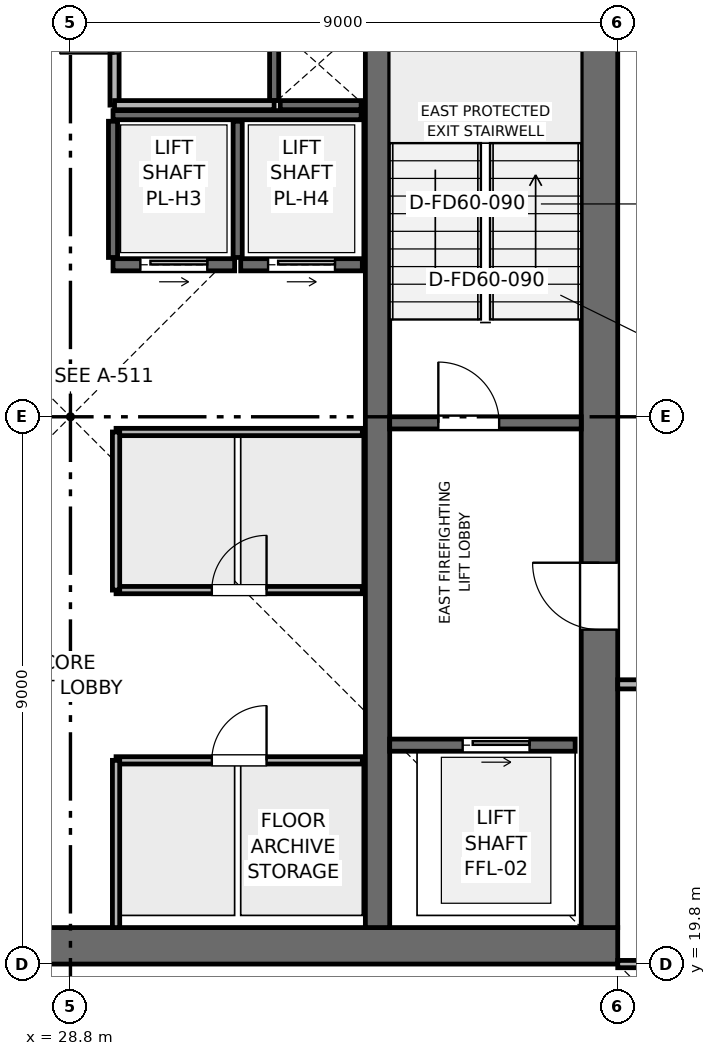
"""IFC4 building model, lengths in metres.
Left out: names, types, materials, properties, quantities, classifications, styles, units other than length and angle.
Written with IfcOpenShell. Run it as: python <this file> out.ifc"""

import sys

from ifc_helpers import new_model, si_unit, direction, frame, frame_2d, origin, place, context, subcontext, project, spatial, rectangle, extrude, element, fill, save


model = new_model("IFC4")
c1 = context("Model", 3, precision=1e-05, world=origin(), true_north=direction((0.0, 1.0)))
c2 = subcontext(c1, "Body", "Model", "MODEL_VIEW")
j1 = project(units=[si_unit("LENGTHUNIT", "METRE"), si_unit("PLANEANGLEUNIT", "RADIAN")], contexts=[c1])
p1 = place(None, origin())
s1 = spatial("IfcSite", under=j1, at=p1, CompositionType="ELEMENT")
p2 = place(p1, origin())
s2 = spatial("IfcBuilding", under=s1, at=p2, CompositionType="ELEMENT")
p3 = place(p2, frame((0.0, 0.0, 344.25)))
s3 = spatial("IfcBuildingStorey", under=s2, at=p3, CompositionType="ELEMENT", Elevation=344.25)
p4 = place(p3, frame((19.8, 20.1, 0.0), z_axis=(0.0, 0.0, 1.0), x_axis=(1.0, 0.0, 0.0)))
e1 = element("IfcWall", 1, at=p4, inside=s3, PredefinedType="SHEAR", context=c2, shape_type="SweptSolid", body=[
    extrude(rectangle(XDim=18.0, YDim=0.6, at=frame_2d((9.0, 0.0))), origin(), (0.0, 0.0, 1.0), 3.75),
])
p5 = place(p3, frame((37.5, 20.4, 0.0), z_axis=(0.0, 0.0, 1.0), x_axis=(0.0, 1.0, 0.0)))
e2 = element("IfcWall", 2, at=p5, inside=s3, PredefinedType="SHEAR", context=c2, shape_type="SweptSolid", body=[
    extrude(rectangle(XDim=16.8, YDim=0.6, at=frame_2d((8.4, 0.0))), origin(), (0.0, 0.0, 1.0), 3.75),
])
p6 = place(p5, frame((4.9, 0.0, 0.0)))
e3 = element("IfcOpeningElement", 3, at=p6, cuts=e2, PredefinedType="OPENING", context=c2, shape_type="SweptSolid", body=[
    extrude(rectangle(XDim=1.1, YDim=2.15, at=frame_2d((0.55, 1.075))), frame((0.0, 0.31, 0.0), z_axis=(0.0, -1.0, 0.0), x_axis=(1.0, 0.0, 0.0)), (0.0, 0.0, 1.0), 0.62),
])
p7 = place(p3, frame((33.85, 20.4, 0.0), z_axis=(0.0, 0.0, 1.0), x_axis=(0.0, 1.0, 0.0)))
e4 = element("IfcWall", 4, at=p7, inside=s3, PredefinedType="SHEAR", context=c2, shape_type="SweptSolid", body=[
    extrude(rectangle(XDim=16.8, YDim=0.4, at=frame_2d((8.4, 0.0))), origin(), (0.0, 0.0, 1.0), 3.75),
])
p8 = place(p3, frame((34.05, 28.7, 0.0), z_axis=(0.0, 0.0, 1.0), x_axis=(1.0, 0.0, 0.0)))
e5 = element("IfcWall", 5, at=p8, inside=s3, PredefinedType="SHEAR", context=c2, shape_type="SweptSolid", body=[
    extrude(rectangle(XDim=3.15, YDim=0.2, at=frame_2d((1.575, 0.0))), origin(), (0.0, 0.0, 1.0), 3.51),
])
p9 = place(p8, frame((0.8, 0.0, 0.0)))
e6 = element("IfcOpeningElement", 6, at=p9, cuts=e5, PredefinedType="OPENING", context=c2, shape_type="SweptSolid", body=[
    extrude(rectangle(XDim=1.0, YDim=2.1, at=frame_2d((0.5, 1.05))), frame((0.0, 0.11, 0.0), z_axis=(0.0, -1.0, 0.0), x_axis=(1.0, 0.0, 0.0)), (0.0, 0.0, 1.0), 0.22),
])
p10 = place(p3, frame((32.15, 34.0, 0.0), z_axis=(0.0, 0.0, 1.0), x_axis=(0.0, 1.0, 0.0)))
e7 = element("IfcWall", 7, at=p10, inside=s3, PredefinedType="SHEAR", context=c2, shape_type="SweptSolid", body=[
    extrude(rectangle(XDim=3.2, YDim=0.15, at=frame_2d((1.6, 0.0))), origin(), (0.0, 0.0, 1.0), 3.51),
])
p11 = place(p3, frame((32.25, 33.925, 0.0), z_axis=(0.0, 0.0, 1.0), x_axis=(1.0, 0.0, 0.0)))
e8 = element("IfcWall", 8, at=p11, inside=s3, PredefinedType="SHEAR", context=c2, shape_type="SweptSolid", body=[
    extrude(rectangle(XDim=1.33, YDim=0.15, at=frame_2d((0.665, 0.0))), origin(), (0.0, 0.0, 1.0), 3.51),
])
p12 = place(p3, frame((34.05, 23.4, 0.0), z_axis=(0.0, 0.0, 1.0), x_axis=(1.0, 0.0, 0.0)))
e9 = element("IfcWall", 9, at=p12, inside=s3, PredefinedType="SHEAR", context=c2, shape_type="SweptSolid", body=[
    extrude(rectangle(XDim=3.05, YDim=0.2, at=frame_2d((1.525, 0.0))), origin(), (0.0, 0.0, 1.0), 3.51),
])
p13 = place(p12, frame((1.2, 0.0, 0.0)))
e10 = element("IfcOpeningElement", 10, at=p13, cuts=e9, PredefinedType="OPENING", context=c2, shape_type="SweptSolid", body=[
    extrude(rectangle(XDim=1.1, YDim=2.15, at=frame_2d((0.55, 1.075))), frame((0.0, 0.11, 0.0), z_axis=(0.0, -1.0, 0.0), x_axis=(1.0, 0.0, 0.0)), (0.0, 0.0, 1.0), 0.22),
])
p14 = place(p3, frame((29.5, 31.3, 0.0), z_axis=(0.0, 0.0, 1.0), x_axis=(1.0, 0.0, 0.0)))
e11 = element("IfcWall", 11, at=p14, inside=s3, PredefinedType="SHEAR", context=c2, shape_type="SweptSolid", body=[
    extrude(rectangle(XDim=2.0, YDim=0.2, at=frame_2d((1.0, 0.0))), origin(), (0.0, 0.0, 1.0), 3.51),
])
p15 = place(p14, frame((0.45, 0.0, 0.0)))
e12 = element("IfcOpeningElement", 12, at=p15, cuts=e11, PredefinedType="OPENING", context=c2, shape_type="SweptSolid", body=[
    extrude(rectangle(XDim=1.1, YDim=2.15, at=frame_2d((0.55, 1.075))), frame((0.0, 0.11, 0.0), z_axis=(0.0, -1.0, 0.0), x_axis=(1.0, 0.0, 0.0)), (0.0, 0.0, 1.0), 0.22),
])
p16 = place(p3, frame((31.6, 31.3, 0.0), z_axis=(0.0, 0.0, 1.0), x_axis=(1.0, 0.0, 0.0)))
e13 = element("IfcWall", 13, at=p16, inside=s3, PredefinedType="SHEAR", context=c2, shape_type="SweptSolid", body=[
    extrude(rectangle(XDim=2.0, YDim=0.2, at=frame_2d((1.0, 0.0))), origin(), (0.0, 0.0, 1.0), 3.51),
])
p17 = place(p16, frame((0.45, 0.0, 0.0)))
e14 = element("IfcOpeningElement", 14, at=p17, cuts=e13, PredefinedType="OPENING", context=c2, shape_type="SweptSolid", body=[
    extrude(rectangle(XDim=1.1, YDim=2.15, at=frame_2d((0.55, 1.075))), frame((0.0, 0.11, 0.0), z_axis=(0.0, -1.0, 0.0), x_axis=(1.0, 0.0, 0.0)), (0.0, 0.0, 1.0), 0.22),
])
p18 = place(p3, frame((29.5, 33.76, 0.0), z_axis=(0.0, 0.0, 1.0), x_axis=(1.0, 0.0, 0.0)))
e15 = element("IfcWall", 15, at=p18, inside=s3, PredefinedType="SHEAR", context=c2, shape_type="SweptSolid", body=[
    extrude(rectangle(XDim=4.08, YDim=0.15, at=frame_2d((2.04, 0.0))), origin(), (0.0, 0.0, 1.0), 3.51),
])
for number, where, z_axis, x_axis in (
    (16, (29.5, 31.42, 0.0), (0.0, 0.0, 1.0), (0.0, 1.0, 0.0)),
    (17, (31.55, 31.42, 0.0), (0.0, 0.0, 1.0), (0.0, 1.0, 0.0)),
):
    element("IfcWall", number, at=place(p3, frame(where, z_axis=z_axis, x_axis=x_axis)), inside=s3, PredefinedType="SHEAR", context=c2, shape_type="SweptSolid", body=[
        extrude(rectangle(XDim=2.24, YDim=0.15, at=frame_2d((1.12, 0.0))), origin(), (0.0, 0.0, 1.0), 3.51),
    ])
p19 = place(p3, frame((29.525, 33.925, 0.0), z_axis=(0.0, 0.0, 1.0), x_axis=(0.0, 1.0, 0.0)))
e18 = element("IfcWall", 18, at=p19, inside=s3, PredefinedType="PARTITIONING", context=c2, shape_type="SweptSolid", body=[
    extrude(rectangle(XDim=3.275, YDim=0.15, at=frame_2d((1.637, 0.0))), origin(), (0.0, 0.0, 1.0), 3.51),
])
p20 = place(p19, frame((0.85, 0.0, 0.0)))
e19 = element("IfcOpeningElement", 19, at=p20, cuts=e18, PredefinedType="OPENING", context=c2, shape_type="SweptSolid", body=[
    extrude(rectangle(XDim=0.9, YDim=2.1, at=frame_2d((0.45, 1.05))), frame((0.0, 0.085, 0.0), z_axis=(0.0, -1.0, 0.0), x_axis=(1.0, 0.0, 0.0)), (0.0, 0.0, 1.0), 0.17),
])
p21 = place(p3, frame((29.525, 33.925, 0.0), z_axis=(0.0, 0.0, 1.0), x_axis=(1.0, 0.0, 0.0)))
e20 = element("IfcWall", 20, at=p21, inside=s3, PredefinedType="PARTITIONING", context=c2, shape_type="SweptSolid", body=[
    extrude(rectangle(XDim=2.625, YDim=0.15, at=frame_2d((1.312, 0.0))), origin(), (0.0, 0.0, 1.0), 3.51),
])
p22 = place(p3, frame((29.55, 23.15, 0.0), z_axis=(0.0, 0.0, 1.0), x_axis=(1.0, 0.0, 0.0)))
e21 = element("IfcWall", 21, at=p22, inside=s3, PredefinedType="PARTITIONING", context=c2, shape_type="SweptSolid", body=[
    extrude(rectangle(XDim=4.05, YDim=0.12, at=frame_2d((2.025, 0.0))), origin(), (0.0, 0.0, 1.0), 3.51),
])
p23 = place(p22, frame((1.575, 0.0, 0.0)))
e22 = element("IfcOpeningElement", 22, at=p23, cuts=e21, PredefinedType="OPENING", context=c2, shape_type="SweptSolid", body=[
    extrude(rectangle(XDim=0.9, YDim=2.1, at=frame_2d((0.45, 1.05))), frame((0.0, 0.07, 0.0), z_axis=(0.0, -1.0, 0.0), x_axis=(1.0, 0.0, 0.0)), (0.0, 0.0, 1.0), 0.14),
])
p24 = place(p3, frame((29.55, 20.4, 0.0), z_axis=(0.0, 0.0, 1.0), x_axis=(0.0, 1.0, 0.0)))
e23 = element("IfcWall", 23, at=p24, inside=s3, PredefinedType="PARTITIONING", context=c2, shape_type="SweptSolid", body=[
    extrude(rectangle(XDim=2.75, YDim=0.12, at=frame_2d((1.375, 0.0))), origin(), (0.0, 0.0, 1.0), 3.51),
])
p25 = place(p3, frame((29.55, 25.95, 0.0), z_axis=(0.0, 0.0, 1.0), x_axis=(1.0, 0.0, 0.0)))
e24 = element("IfcWall", 24, at=p25, inside=s3, PredefinedType="PARTITIONING", context=c2, shape_type="SweptSolid", body=[
    extrude(rectangle(XDim=4.05, YDim=0.12, at=frame_2d((2.025, 0.0))), origin(), (0.0, 0.0, 1.0), 3.51),
])
p26 = place(p25, frame((1.575, 0.0, 0.0)))
e25 = element("IfcOpeningElement", 25, at=p26, cuts=e24, PredefinedType="OPENING", context=c2, shape_type="SweptSolid", body=[
    extrude(rectangle(XDim=0.9, YDim=2.1, at=frame_2d((0.45, 1.05))), frame((0.0, 0.07, 0.0), z_axis=(0.0, -1.0, 0.0), x_axis=(1.0, 0.0, 0.0)), (0.0, 0.0, 1.0), 0.14),
])
p27 = place(p3, frame((29.55, 28.55, 0.0), z_axis=(0.0, 0.0, 1.0), x_axis=(1.0, 0.0, 0.0)))
e26 = element("IfcWall", 26, at=p27, inside=s3, PredefinedType="PARTITIONING", context=c2, shape_type="SweptSolid", body=[
    extrude(rectangle(XDim=4.05, YDim=0.12, at=frame_2d((2.025, 0.0))), origin(), (0.0, 0.0, 1.0), 3.51),
])
p28 = place(p3, frame((29.55, 25.95, 0.0), z_axis=(0.0, 0.0, 1.0), x_axis=(0.0, 1.0, 0.0)))
e27 = element("IfcWall", 27, at=p28, inside=s3, PredefinedType="PARTITIONING", context=c2, shape_type="SweptSolid", body=[
    extrude(rectangle(XDim=2.6, YDim=0.12, at=frame_2d((1.3, 0.0))), origin(), (0.0, 0.0, 1.0), 3.51),
])
p29 = place(p3, frame((37.8, 19.8, 0.0), z_axis=(0.0, 0.0, 1.0), x_axis=(1.0, 0.0, 0.0)))
e28 = element("IfcWall", 28, at=p29, inside=s3, PredefinedType="PARTITIONING", context=c2, shape_type="SweptSolid", body=[
    extrude(rectangle(XDim=12.17, YDim=0.12, at=frame_2d((6.085, 0.0))), origin(), (0.0, 0.0, 1.0), 3.095),
])
p30 = place(p3, frame((37.8, 24.4, 0.0), z_axis=(0.0, 0.0, 1.0), x_axis=(1.0, 0.0, 0.0)))
e29 = element("IfcWall", 29, at=p30, inside=s3, PredefinedType="PARTITIONING", context=c2, shape_type="SweptSolid", body=[
    extrude(rectangle(XDim=1.9, YDim=0.15, at=frame_2d((0.95, 0.0))), origin(), (0.0, 0.0, 1.0), 3.51),
])
p31 = place(p30, frame((0.45, 0.0, 0.0)))
e30 = element("IfcOpeningElement", 30, at=p31, cuts=e29, PredefinedType="OPENING", context=c2, shape_type="SweptSolid", body=[
    extrude(rectangle(XDim=0.9, YDim=2.1, at=frame_2d((0.45, 1.05))), frame((0.0, 0.085, 0.0), z_axis=(0.0, -1.0, 0.0), x_axis=(1.0, 0.0, 0.0)), (0.0, 0.0, 1.0), 0.17),
])
p32 = place(p9, origin())
e31 = element("IfcDoor", 31, at=p32, inside=s3, OperationType="SINGLE_SWING_LEFT", PredefinedType="DOOR", context=c2, shape_type="SweptSolid", body=[
    extrude(rectangle(XDim=1.0, YDim=2.1, at=frame_2d((0.5, 1.05))), frame((0.0, 0.025, 0.0), z_axis=(0.0, -1.0, 0.0), x_axis=(1.0, 0.0, 0.0)), (0.0, 0.0, 1.0), 0.05),
])
fill(e6, e31)
p33 = place(p13, origin())
e32 = element("IfcDoor", 32, at=p33, inside=s3, OperationType="SLIDING_TO_RIGHT", PredefinedType="DOOR", context=c2, shape_type="SweptSolid", body=[
    extrude(rectangle(XDim=1.1, YDim=2.15, at=frame_2d((0.55, 1.075))), frame((0.0, 0.025, 0.0), z_axis=(0.0, -1.0, 0.0), x_axis=(1.0, 0.0, 0.0)), (0.0, 0.0, 1.0), 0.05),
])
fill(e10, e32)
p34 = place(p15, origin())
e33 = element("IfcDoor", 33, at=p34, inside=s3, OperationType="SLIDING_TO_RIGHT", PredefinedType="DOOR", context=c2, shape_type="SweptSolid", body=[
    extrude(rectangle(XDim=1.1, YDim=2.15, at=frame_2d((0.55, 1.075))), frame((0.0, 0.025, 0.0), z_axis=(0.0, -1.0, 0.0), x_axis=(1.0, 0.0, 0.0)), (0.0, 0.0, 1.0), 0.05),
])
fill(e12, e33)
p35 = place(p17, origin())
e34 = element("IfcDoor", 34, at=p35, inside=s3, OperationType="SLIDING_TO_RIGHT", PredefinedType="DOOR", context=c2, shape_type="SweptSolid", body=[
    extrude(rectangle(XDim=1.1, YDim=2.15, at=frame_2d((0.55, 1.075))), frame((0.0, 0.025, 0.0), z_axis=(0.0, -1.0, 0.0), x_axis=(1.0, 0.0, 0.0)), (0.0, 0.0, 1.0), 0.05),
])
fill(e14, e34)
p36 = place(p20, origin())
e35 = element("IfcDoor", 35, at=p36, inside=s3, OperationType="SINGLE_SWING_LEFT", PredefinedType="DOOR", context=c2, shape_type="SweptSolid", body=[
    extrude(rectangle(XDim=0.9, YDim=2.1, at=frame_2d((0.45, 1.05))), frame((0.0, 0.025, 0.0), z_axis=(0.0, -1.0, 0.0), x_axis=(1.0, 0.0, 0.0)), (0.0, 0.0, 1.0), 0.05),
])
fill(e19, e35)
p37 = place(p23, origin())
e36 = element("IfcDoor", 36, at=p37, inside=s3, OperationType="SINGLE_SWING_RIGHT", PredefinedType="DOOR", context=c2, shape_type="SweptSolid", body=[
    extrude(rectangle(XDim=0.9, YDim=2.1, at=frame_2d((0.45, 1.05))), frame((0.0, 0.025, 0.0), z_axis=(0.0, -1.0, 0.0), x_axis=(1.0, 0.0, 0.0)), (0.0, 0.0, 1.0), 0.05),
])
fill(e22, e36)
p38 = place(p26, origin())
e37 = element("IfcDoor", 37, at=p38, inside=s3, OperationType="SINGLE_SWING_RIGHT", PredefinedType="DOOR", context=c2, shape_type="SweptSolid", body=[
    extrude(rectangle(XDim=0.9, YDim=2.1, at=frame_2d((0.45, 1.05))), frame((0.0, 0.025, 0.0), z_axis=(0.0, -1.0, 0.0), x_axis=(1.0, 0.0, 0.0)), (0.0, 0.0, 1.0), 0.05),
])
fill(e25, e37)
p39 = place(p6, origin())
e38 = element("IfcDoor", 38, at=p39, inside=s3, OperationType="SINGLE_SWING_RIGHT", PredefinedType="DOOR", context=c2, shape_type="SweptSolid", body=[
    extrude(rectangle(XDim=1.1, YDim=2.15, at=frame_2d((0.55, 1.075))), frame((0.0, 0.025, 0.0), z_axis=(0.0, -1.0, 0.0), x_axis=(1.0, 0.0, 0.0)), (0.0, 0.0, 1.0), 0.05),
])
fill(e3, e38)
save(model, sys.argv[1])
